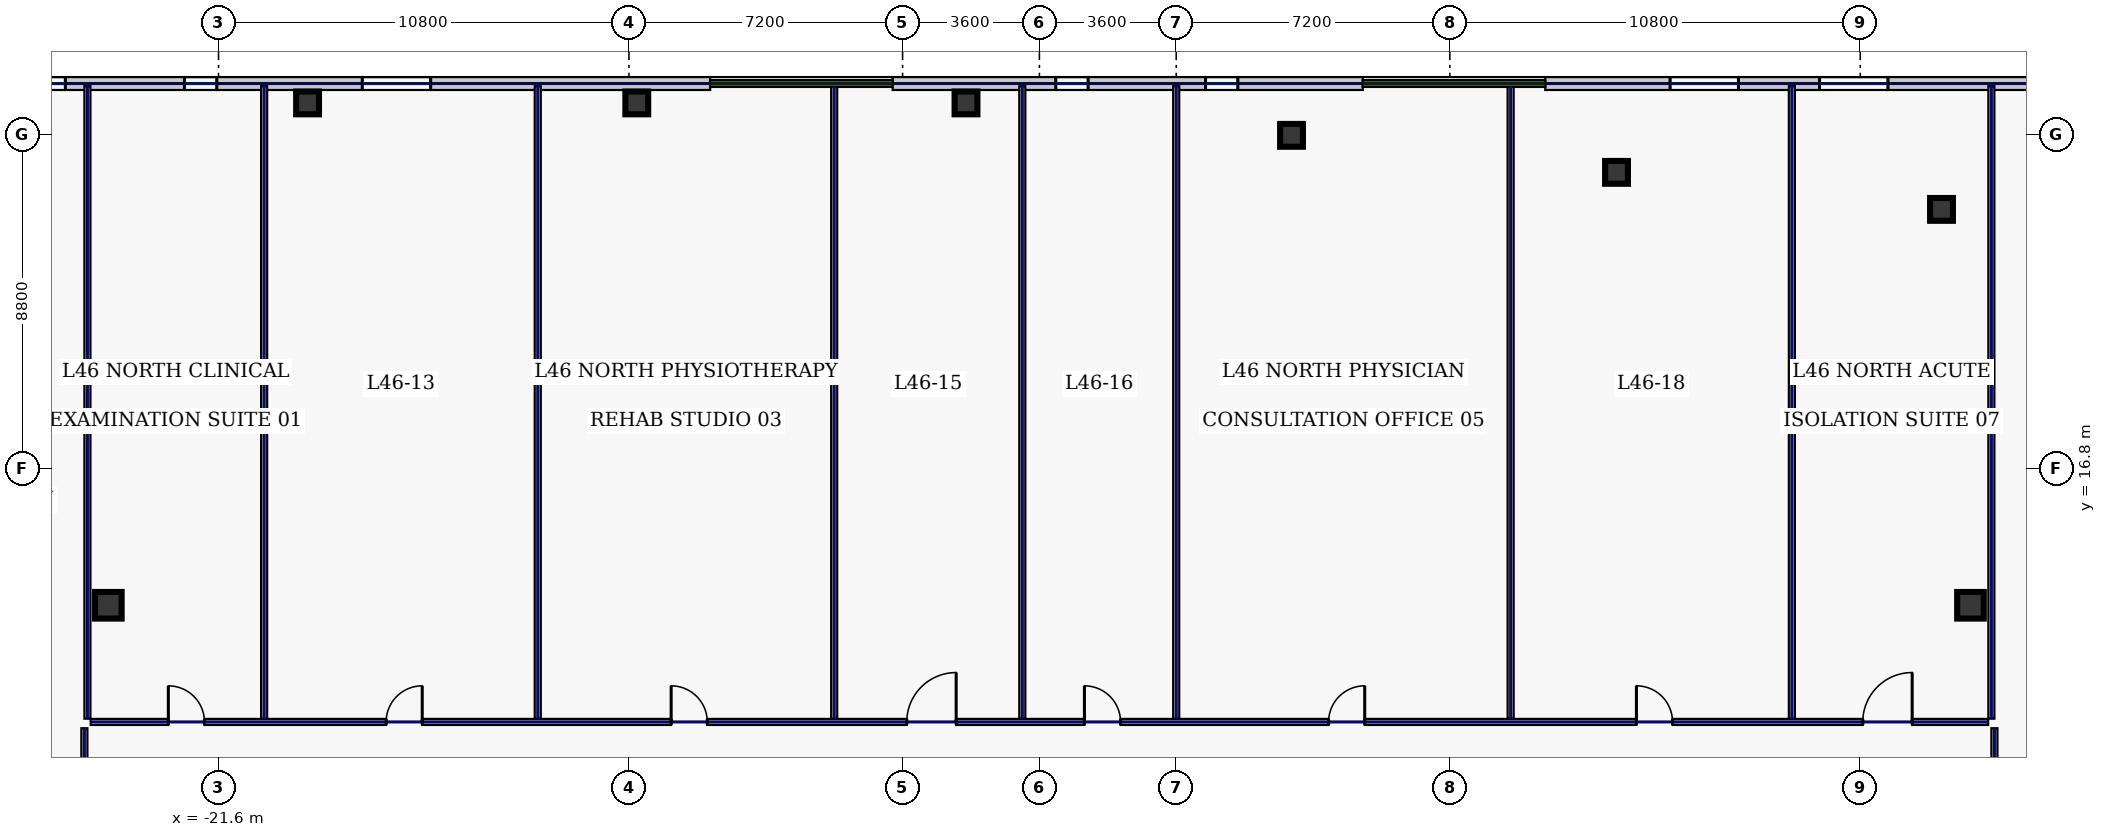
"""IFC4 building model, lengths in metres.
Left out: names, types, materials, properties, quantities, classifications, styles, units other than length and angle.
Written with IfcOpenShell. Run it as: python <this file> out.ifc"""

import sys

from ifc_helpers import new_model, si_unit, direction, frame, frame_2d, origin, origin_2d, place, context, subcontext, project, spatial, rectangle, hollow_rectangle, extrude, element, fill, save


model = new_model("IFC4")
c1 = context("Model", 3, precision=1e-05, world=origin(), true_north=direction((0.0, 1.0)))
c2 = subcontext(c1, "Body", "Model", "MODEL_VIEW")
j1 = project(units=[si_unit("LENGTHUNIT", "METRE"), si_unit("PLANEANGLEUNIT", "RADIAN")], contexts=[c1])
p1 = place(None, origin())
s1 = spatial("IfcSite", under=j1, at=p1, CompositionType="ELEMENT")
p2 = place(p1, origin())
s2 = spatial("IfcBuilding", under=s1, at=p2, CompositionType="ELEMENT")
p3 = place(p2, frame((0.0, 0.0, 200.2)))
s3 = spatial("IfcBuildingStorey", under=s2, at=p3, CompositionType="ELEMENT", Elevation=200.2)
for number, where, z_axis, x_axis in (
    (1, (-24.5, 13.2, 0.0), (0.0, 0.0, 1.0), (1.0, 0.0, 0.0)),
    (2, (24.5, 13.2, 0.0), (0.0, 0.0, 1.0), (1.0, 0.0, 0.0)),
):
    element("IfcColumn", number, at=place(p3, frame(where, z_axis=z_axis, x_axis=x_axis)), inside=s3, PredefinedType="COLUMN", context=c2, shape_type="SweptSolid", body=[
        extrude(hollow_rectangle(XDim=0.7, YDim=0.7, WallThickness=0.032, at=origin_2d()), origin(), (0.0, 0.0, 1.0), 3.74),
    ])
for number, where, z_axis, x_axis in (
    (3, (23.738, 23.618, 0.0), (0.0, 0.0, 1.0), (1.0, 0.0, 0.0)),
    (4, (15.186, 24.592, 0.0), (0.0, 0.0, 1.0), (1.0, 0.0, 0.0)),
    (5, (6.634, 25.567, 0.0), (0.0, 0.0, 1.0), (1.0, 0.0, 0.0)),
    (6, (-1.931, 26.42, 0.0), (0.0, 0.0, 1.0), (1.0, 0.0, 0.0)),
    (7, (-10.594, 26.42, 0.0), (0.0, 0.0, 1.0), (1.0, 0.0, 0.0)),
    (8, (-19.257, 26.42, 0.0), (0.0, 0.0, 1.0), (1.0, 0.0, 0.0)),
):
    element("IfcColumn", number, at=place(p3, frame(where, z_axis=z_axis, x_axis=x_axis)), inside=s3, PredefinedType="COLUMN", context=c2, shape_type="SweptSolid", body=[
        extrude(hollow_rectangle(XDim=0.6, YDim=0.6, WallThickness=0.028, at=origin_2d()), origin(), (0.0, 0.0, 1.0), 3.74),
    ])
p4 = place(p3, frame((33.4, 26.93, 0.0), z_axis=(0.0, 0.0, 1.0), x_axis=(-1.0, 0.0, 0.0)))
e9 = element("IfcWall", 9, at=p4, inside=s3, PredefinedType="STANDARD", context=c2, shape_type="SweptSolid", body=[
    extrude(rectangle(XDim=20.09, YDim=0.34, at=frame_2d((10.045, 0.0))), origin(), (0.0, 0.0, 1.0), 3.74),
])
p5 = place(p4, frame((15.005, 0.0, 0.7)))
e10 = element("IfcOpeningElement", 10, at=p5, cuts=e9, PredefinedType="OPENING", context=c2, shape_type="SweptSolid", body=[
    extrude(rectangle(XDim=1.8, YDim=2.2, at=frame_2d((0.9, 1.1))), frame((0.0, 0.18, 0.0), z_axis=(0.0, -1.0, 0.0), x_axis=(1.0, 0.0, 0.0)), (0.0, 0.0, 1.0), 0.36),
])
p6 = place(p4, frame((11.071, 0.0, 0.7)))
e11 = element("IfcOpeningElement", 11, at=p6, cuts=e9, PredefinedType="OPENING", context=c2, shape_type="SweptSolid", body=[
    extrude(rectangle(XDim=1.8, YDim=2.2, at=frame_2d((0.9, 1.1))), frame((0.0, 0.18, 0.0), z_axis=(0.0, -1.0, 0.0), x_axis=(1.0, 0.0, 0.0)), (0.0, 0.0, 1.0), 0.36),
])
p7 = place(p4, frame((6.48, 0.0, 0.7)))
e12 = element("IfcOpeningElement", 12, at=p7, cuts=e9, PredefinedType="OPENING", context=c2, shape_type="SweptSolid", body=[
    extrude(rectangle(XDim=0.85, YDim=1.85, at=frame_2d((0.425, 0.925))), frame((0.0, 0.18, 0.0), z_axis=(0.0, -1.0, 0.0), x_axis=(1.0, 0.0, 0.0)), (0.0, 0.0, 1.0), 0.36),
])
p8 = place(p4, frame((2.591, 0.0, 0.7)))
e13 = element("IfcOpeningElement", 13, at=p8, cuts=e9, PredefinedType="OPENING", context=c2, shape_type="SweptSolid", body=[
    extrude(rectangle(XDim=1.8, YDim=2.2, at=frame_2d((0.9, 1.1))), frame((0.0, 0.18, 0.0), z_axis=(0.0, -1.0, 0.0), x_axis=(1.0, 0.0, 0.0)), (0.0, 0.0, 1.0), 0.36),
])
p9 = place(p3, frame((8.51, 26.93, 0.0), z_axis=(0.0, 0.0, 1.0), x_axis=(-1.0, 0.0, 0.0)))
e14 = element("IfcWall", 14, at=p9, inside=s3, PredefinedType="STANDARD", context=c2, shape_type="SweptSolid", body=[
    extrude(rectangle(XDim=12.373, YDim=0.34, at=frame_2d((6.187, 0.0))), origin(), (0.0, 0.0, 1.0), 3.74),
])
p10 = place(p9, frame((7.229, 0.0, 0.7)))
e15 = element("IfcOpeningElement", 15, at=p10, cuts=e14, PredefinedType="OPENING", context=c2, shape_type="SweptSolid", body=[
    extrude(rectangle(XDim=0.85, YDim=1.85, at=frame_2d((0.425, 0.925))), frame((0.0, 0.18, 0.0), z_axis=(0.0, -1.0, 0.0), x_axis=(1.0, 0.0, 0.0)), (0.0, 0.0, 1.0), 0.36),
])
p11 = place(p9, frame((3.289, 0.0, 0.7)))
e16 = element("IfcOpeningElement", 16, at=p11, cuts=e14, PredefinedType="OPENING", context=c2, shape_type="SweptSolid", body=[
    extrude(rectangle(XDim=0.85, YDim=1.85, at=frame_2d((0.425, 0.925))), frame((0.0, 0.18, 0.0), z_axis=(0.0, -1.0, 0.0), x_axis=(1.0, 0.0, 0.0)), (0.0, 0.0, 1.0), 0.36),
])
p12 = place(p3, frame((-8.663, 26.93, 0.0), z_axis=(0.0, 0.0, 1.0), x_axis=(-1.0, 0.0, 0.0)))
e17 = element("IfcWall", 17, at=p12, inside=s3, PredefinedType="STANDARD", context=c2, shape_type="SweptSolid", body=[
    extrude(rectangle(XDim=19.937, YDim=0.34, at=frame_2d((9.969, 0.0))), origin(), (0.0, 0.0, 1.0), 3.74),
])
p13 = place(p12, frame((16.968, 0.0, 0.7)))
e18 = element("IfcOpeningElement", 18, at=p13, cuts=e17, PredefinedType="OPENING", context=c2, shape_type="SweptSolid", body=[
    extrude(rectangle(XDim=0.85, YDim=1.85, at=frame_2d((0.425, 0.925))), frame((0.0, 0.18, 0.0), z_axis=(0.0, -1.0, 0.0), x_axis=(1.0, 0.0, 0.0)), (0.0, 0.0, 1.0), 0.36),
])
p14 = place(p12, frame((12.983, 0.0, 0.7)))
e19 = element("IfcOpeningElement", 19, at=p14, cuts=e17, PredefinedType="OPENING", context=c2, shape_type="SweptSolid", body=[
    extrude(rectangle(XDim=0.85, YDim=1.85, at=frame_2d((0.425, 0.925))), frame((0.0, 0.18, 0.0), z_axis=(0.0, -1.0, 0.0), x_axis=(1.0, 0.0, 0.0)), (0.0, 0.0, 1.0), 0.36),
])
p15 = place(p12, frame((7.355, 0.0, 0.7)))
e20 = element("IfcOpeningElement", 20, at=p15, cuts=e17, PredefinedType="OPENING", context=c2, shape_type="SweptSolid", body=[
    extrude(rectangle(XDim=1.8, YDim=2.2, at=frame_2d((0.9, 1.1))), frame((0.0, 0.18, 0.0), z_axis=(0.0, -1.0, 0.0), x_axis=(1.0, 0.0, 0.0)), (0.0, 0.0, 1.0), 0.36),
])
p16 = place(p3, frame((-25.13, 6.985, 0.0), z_axis=(0.0, 0.0, 1.0), x_axis=(0.0, 1.0, 0.0)))
e21 = element("IfcWall", 21, at=p16, inside=s3, PredefinedType="PARTITIONING", context=c2, shape_type="SweptSolid", body=[
    extrude(rectangle(XDim=2.98, YDim=0.16, at=frame_2d((1.49, 0.0))), origin(), (0.0, 0.0, 1.0), 3.74),
])
p17 = place(p16, frame((1.1, 0.0, 0.0)))
e22 = element("IfcOpeningElement", 22, at=p17, cuts=e21, PredefinedType="OPENING", context=c2, shape_type="SweptSolid", body=[
    extrude(rectangle(XDim=0.95, YDim=2.2, at=frame_2d((0.475, 1.1))), frame((0.0, 0.09, 0.0), z_axis=(0.0, -1.0, 0.0), x_axis=(1.0, 0.0, 0.0)), (0.0, 0.0, 1.0), 0.18),
])
p18 = place(p3, frame((-24.965, 10.13, 0.0), z_axis=(0.0, 0.0, 1.0), x_axis=(1.0, 0.0, 0.0)))
e23 = element("IfcWall", 23, at=p18, inside=s3, PredefinedType="PARTITIONING", context=c2, shape_type="SweptSolid", body=[
    extrude(rectangle(XDim=49.93, YDim=0.16, at=frame_2d((24.965, 0.0))), origin(), (0.0, 0.0, 1.0), 3.74),
])
p19 = place(p18, frame((2.044, 0.0, 0.0)))
e24 = element("IfcOpeningElement", 24, at=p19, cuts=e23, PredefinedType="OPENING", context=c2, shape_type="SweptSolid", body=[
    extrude(rectangle(XDim=0.95, YDim=2.2, at=frame_2d((0.475, 1.1))), frame((0.0, 0.09, 0.0), z_axis=(0.0, -1.0, 0.0), x_axis=(1.0, 0.0, 0.0)), (0.0, 0.0, 1.0), 0.18),
])
p20 = place(p18, frame((7.775, 0.0, 0.0)))
e25 = element("IfcOpeningElement", 25, at=p20, cuts=e23, PredefinedType="OPENING", context=c2, shape_type="SweptSolid", body=[
    extrude(rectangle(XDim=0.95, YDim=2.2, at=frame_2d((0.475, 1.1))), frame((0.0, 0.09, 0.0), z_axis=(0.0, -1.0, 0.0), x_axis=(1.0, 0.0, 0.0)), (0.0, 0.0, 1.0), 0.18),
])
p21 = place(p18, frame((15.275, 0.0, 0.0)))
e26 = element("IfcOpeningElement", 26, at=p21, cuts=e23, PredefinedType="OPENING", context=c2, shape_type="SweptSolid", body=[
    extrude(rectangle(XDim=0.95, YDim=2.2, at=frame_2d((0.475, 1.1))), frame((0.0, 0.09, 0.0), z_axis=(0.0, -1.0, 0.0), x_axis=(1.0, 0.0, 0.0)), (0.0, 0.0, 1.0), 0.18),
])
p22 = place(p18, frame((21.475, 0.0, 0.0)))
e27 = element("IfcOpeningElement", 27, at=p22, cuts=e23, PredefinedType="OPENING", context=c2, shape_type="SweptSolid", body=[
    extrude(rectangle(XDim=1.3, YDim=2.2, at=frame_2d((0.65, 1.1))), frame((0.0, 0.09, 0.0), z_axis=(0.0, -1.0, 0.0), x_axis=(1.0, 0.0, 0.0)), (0.0, 0.0, 1.0), 0.18),
])
p23 = place(p18, frame((26.15, 0.0, 0.0)))
e28 = element("IfcOpeningElement", 28, at=p23, cuts=e23, PredefinedType="OPENING", context=c2, shape_type="SweptSolid", body=[
    extrude(rectangle(XDim=0.95, YDim=2.2, at=frame_2d((0.475, 1.1))), frame((0.0, 0.09, 0.0), z_axis=(0.0, -1.0, 0.0), x_axis=(1.0, 0.0, 0.0)), (0.0, 0.0, 1.0), 0.18),
])
p24 = place(p18, frame((32.575, 0.0, 0.0)))
e29 = element("IfcOpeningElement", 29, at=p24, cuts=e23, PredefinedType="OPENING", context=c2, shape_type="SweptSolid", body=[
    extrude(rectangle(XDim=0.95, YDim=2.2, at=frame_2d((0.475, 1.1))), frame((0.0, 0.09, 0.0), z_axis=(0.0, -1.0, 0.0), x_axis=(1.0, 0.0, 0.0)), (0.0, 0.0, 1.0), 0.18),
])
p25 = place(p18, frame((40.675, 0.0, 0.0)))
e30 = element("IfcOpeningElement", 30, at=p25, cuts=e23, PredefinedType="OPENING", context=c2, shape_type="SweptSolid", body=[
    extrude(rectangle(XDim=0.95, YDim=2.2, at=frame_2d((0.475, 1.1))), frame((0.0, 0.09, 0.0), z_axis=(0.0, -1.0, 0.0), x_axis=(1.0, 0.0, 0.0)), (0.0, 0.0, 1.0), 0.18),
])
p26 = place(p18, frame((46.631, 0.0, 0.0)))
e31 = element("IfcOpeningElement", 31, at=p26, cuts=e23, PredefinedType="OPENING", context=c2, shape_type="SweptSolid", body=[
    extrude(rectangle(XDim=1.3, YDim=2.2, at=frame_2d((0.65, 1.1))), frame((0.0, 0.09, 0.0), z_axis=(0.0, -1.0, 0.0), x_axis=(1.0, 0.0, 0.0)), (0.0, 0.0, 1.0), 0.18),
])
p27 = place(p3, frame((25.13, 9.965, 0.0), z_axis=(0.0, 0.0, 1.0), x_axis=(0.0, -1.0, 0.0)))
e32 = element("IfcWall", 32, at=p27, inside=s3, PredefinedType="PARTITIONING", context=c2, shape_type="SweptSolid", body=[
    extrude(rectangle(XDim=2.98, YDim=0.16, at=frame_2d((1.49, 0.0))), origin(), (0.0, 0.0, 1.0), 3.74),
])
p28 = place(p27, frame((1.1, 0.0, 0.0)))
e33 = element("IfcOpeningElement", 33, at=p28, cuts=e32, PredefinedType="OPENING", context=c2, shape_type="SweptSolid", body=[
    extrude(rectangle(XDim=0.95, YDim=2.2, at=frame_2d((0.475, 1.1))), frame((0.0, 0.09, 0.0), z_axis=(0.0, -1.0, 0.0), x_axis=(1.0, 0.0, 0.0)), (0.0, 0.0, 1.0), 0.18),
])
p29 = place(p3, frame((-25.05, 10.215, 0.0), z_axis=(0.0, 0.0, 1.0), x_axis=(0.0, 1.0, 0.0)))
e34 = element("IfcWall", 34, at=p29, inside=s3, PredefinedType="PARTITIONING", context=c2, shape_type="SweptSolid", body=[
    extrude(rectangle(XDim=16.645, YDim=0.16, at=frame_2d((8.323, 0.0))), origin(), (0.0, 0.0, 1.0), 3.285),
])
for number, where, z_axis, x_axis in (
    (35, (25.05, 10.215, 0.0), (0.0, 0.0, 1.0), (0.0, 1.0, 0.0)),
    (36, (-20.4, 10.215, 0.0), (0.0, 0.0, 1.0), (0.0, 1.0, 0.0)),
    (37, (-13.2, 10.215, 0.0), (0.0, 0.0, 1.0), (0.0, 1.0, 0.0)),
    (38, (-5.4, 10.215, 0.0), (0.0, 0.0, 1.0), (0.0, 1.0, 0.0)),
    (39, (3.6, 10.215, 0.0), (0.0, 0.0, 1.0), (0.0, 1.0, 0.0)),
    (40, (12.4, 10.215, 0.0), (0.0, 0.0, 1.0), (0.0, 1.0, 0.0)),
    (41, (19.8, 10.215, 0.0), (0.0, 0.0, 1.0), (0.0, 1.0, 0.0)),
    (42, (-0.45, 10.215, 0.0), (0.0, 0.0, 1.0), (0.0, 1.0, 0.0)),
):
    element("IfcWall", number, at=place(p3, frame(where, z_axis=z_axis, x_axis=x_axis)), inside=s3, PredefinedType="PARTITIONING", context=c2, shape_type="SweptSolid", body=[
        extrude(rectangle(XDim=16.645, YDim=0.16, at=frame_2d((8.323, 0.0))), origin(), (0.0, 0.0, 1.0), 3.74),
    ])
p30 = place(p5, origin())
e43 = element("IfcWindow", 43, at=p30, inside=s3, PartitioningType="SINGLE_PANEL", PredefinedType="WINDOW", context=c2, shape_type="SweptSolid", body=[
    extrude(rectangle(XDim=1.8, YDim=2.2, at=frame_2d((0.9, 1.1))), frame((0.0, 0.03, 0.0), z_axis=(0.0, -1.0, 0.0), x_axis=(1.0, 0.0, 0.0)), (0.0, 0.0, 1.0), 0.06),
])
fill(e10, e43)
p31 = place(p6, origin())
e44 = element("IfcWindow", 44, at=p31, inside=s3, PartitioningType="SINGLE_PANEL", PredefinedType="WINDOW", context=c2, shape_type="SweptSolid", body=[
    extrude(rectangle(XDim=1.8, YDim=2.2, at=frame_2d((0.9, 1.1))), frame((0.0, 0.03, 0.0), z_axis=(0.0, -1.0, 0.0), x_axis=(1.0, 0.0, 0.0)), (0.0, 0.0, 1.0), 0.06),
])
fill(e11, e44)
p32 = place(p10, origin())
e45 = element("IfcWindow", 45, at=p32, inside=s3, PartitioningType="SINGLE_PANEL", PredefinedType="WINDOW", context=c2, shape_type="SweptSolid", body=[
    extrude(rectangle(XDim=0.85, YDim=1.85, at=frame_2d((0.425, 0.925))), frame((0.0, 0.03, 0.0), z_axis=(0.0, -1.0, 0.0), x_axis=(1.0, 0.0, 0.0)), (0.0, 0.0, 1.0), 0.06),
])
fill(e15, e45)
p33 = place(p11, origin())
e46 = element("IfcWindow", 46, at=p33, inside=s3, PartitioningType="SINGLE_PANEL", PredefinedType="WINDOW", context=c2, shape_type="SweptSolid", body=[
    extrude(rectangle(XDim=0.85, YDim=1.85, at=frame_2d((0.425, 0.925))), frame((0.0, 0.03, 0.0), z_axis=(0.0, -1.0, 0.0), x_axis=(1.0, 0.0, 0.0)), (0.0, 0.0, 1.0), 0.06),
])
fill(e16, e46)
p34 = place(p13, origin())
e47 = element("IfcWindow", 47, at=p34, inside=s3, PartitioningType="SINGLE_PANEL", PredefinedType="WINDOW", context=c2, shape_type="SweptSolid", body=[
    extrude(rectangle(XDim=0.85, YDim=1.85, at=frame_2d((0.425, 0.925))), frame((0.0, 0.03, 0.0), z_axis=(0.0, -1.0, 0.0), x_axis=(1.0, 0.0, 0.0)), (0.0, 0.0, 1.0), 0.06),
])
fill(e18, e47)
p35 = place(p14, origin())
e48 = element("IfcWindow", 48, at=p35, inside=s3, PartitioningType="SINGLE_PANEL", PredefinedType="WINDOW", context=c2, shape_type="SweptSolid", body=[
    extrude(rectangle(XDim=0.85, YDim=1.85, at=frame_2d((0.425, 0.925))), frame((0.0, 0.03, 0.0), z_axis=(0.0, -1.0, 0.0), x_axis=(1.0, 0.0, 0.0)), (0.0, 0.0, 1.0), 0.06),
])
fill(e19, e48)
p36 = place(p15, origin())
e49 = element("IfcWindow", 49, at=p36, inside=s3, PartitioningType="SINGLE_PANEL", PredefinedType="WINDOW", context=c2, shape_type="SweptSolid", body=[
    extrude(rectangle(XDim=1.8, YDim=2.2, at=frame_2d((0.9, 1.1))), frame((0.0, 0.03, 0.0), z_axis=(0.0, -1.0, 0.0), x_axis=(1.0, 0.0, 0.0)), (0.0, 0.0, 1.0), 0.06),
])
fill(e20, e49)
p37 = place(p19, origin())
e50 = element("IfcDoor", 50, at=p37, inside=s3, OperationType="SINGLE_SWING_LEFT", PredefinedType="DOOR", context=c2, shape_type="SweptSolid", body=[
    extrude(rectangle(XDim=0.95, YDim=2.2, at=frame_2d((0.475, 1.1))), frame((0.0, 0.025, 0.0), z_axis=(0.0, -1.0, 0.0), x_axis=(1.0, 0.0, 0.0)), (0.0, 0.0, 1.0), 0.05),
])
fill(e24, e50)
p38 = place(p20, origin())
e51 = element("IfcDoor", 51, at=p38, inside=s3, OperationType="SINGLE_SWING_RIGHT", PredefinedType="DOOR", context=c2, shape_type="SweptSolid", body=[
    extrude(rectangle(XDim=0.95, YDim=2.2, at=frame_2d((0.475, 1.1))), frame((0.0, 0.025, 0.0), z_axis=(0.0, -1.0, 0.0), x_axis=(1.0, 0.0, 0.0)), (0.0, 0.0, 1.0), 0.05),
])
fill(e25, e51)
p39 = place(p21, origin())
e52 = element("IfcDoor", 52, at=p39, inside=s3, OperationType="SINGLE_SWING_LEFT", PredefinedType="DOOR", context=c2, shape_type="SweptSolid", body=[
    extrude(rectangle(XDim=0.95, YDim=2.2, at=frame_2d((0.475, 1.1))), frame((0.0, 0.025, 0.0), z_axis=(0.0, -1.0, 0.0), x_axis=(1.0, 0.0, 0.0)), (0.0, 0.0, 1.0), 0.05),
])
fill(e26, e52)
p40 = place(p22, origin())
e53 = element("IfcDoor", 53, at=p40, inside=s3, OperationType="SINGLE_SWING_RIGHT", PredefinedType="DOOR", context=c2, shape_type="SweptSolid", body=[
    extrude(rectangle(XDim=1.3, YDim=2.2, at=frame_2d((0.65, 1.1))), frame((0.0, 0.025, 0.0), z_axis=(0.0, -1.0, 0.0), x_axis=(1.0, 0.0, 0.0)), (0.0, 0.0, 1.0), 0.05),
])
fill(e27, e53)
p41 = place(p23, origin())
e54 = element("IfcDoor", 54, at=p41, inside=s3, OperationType="SINGLE_SWING_LEFT", PredefinedType="DOOR", context=c2, shape_type="SweptSolid", body=[
    extrude(rectangle(XDim=0.95, YDim=2.2, at=frame_2d((0.475, 1.1))), frame((0.0, 0.025, 0.0), z_axis=(0.0, -1.0, 0.0), x_axis=(1.0, 0.0, 0.0)), (0.0, 0.0, 1.0), 0.05),
])
fill(e28, e54)
p42 = place(p24, origin())
e55 = element("IfcDoor", 55, at=p42, inside=s3, OperationType="SINGLE_SWING_RIGHT", PredefinedType="DOOR", context=c2, shape_type="SweptSolid", body=[
    extrude(rectangle(XDim=0.95, YDim=2.2, at=frame_2d((0.475, 1.1))), frame((0.0, 0.025, 0.0), z_axis=(0.0, -1.0, 0.0), x_axis=(1.0, 0.0, 0.0)), (0.0, 0.0, 1.0), 0.05),
])
fill(e29, e55)
p43 = place(p25, origin())
e56 = element("IfcDoor", 56, at=p43, inside=s3, OperationType="SINGLE_SWING_LEFT", PredefinedType="DOOR", context=c2, shape_type="SweptSolid", body=[
    extrude(rectangle(XDim=0.95, YDim=2.2, at=frame_2d((0.475, 1.1))), frame((0.0, 0.025, 0.0), z_axis=(0.0, -1.0, 0.0), x_axis=(1.0, 0.0, 0.0)), (0.0, 0.0, 1.0), 0.05),
])
fill(e30, e56)
p44 = place(p26, origin())
e57 = element("IfcDoor", 57, at=p44, inside=s3, OperationType="SINGLE_SWING_RIGHT", PredefinedType="DOOR", context=c2, shape_type="SweptSolid", body=[
    extrude(rectangle(XDim=1.3, YDim=2.2, at=frame_2d((0.65, 1.1))), frame((0.0, 0.025, 0.0), z_axis=(0.0, -1.0, 0.0), x_axis=(1.0, 0.0, 0.0)), (0.0, 0.0, 1.0), 0.05),
])
fill(e31, e57)
save(model, sys.argv[1])
